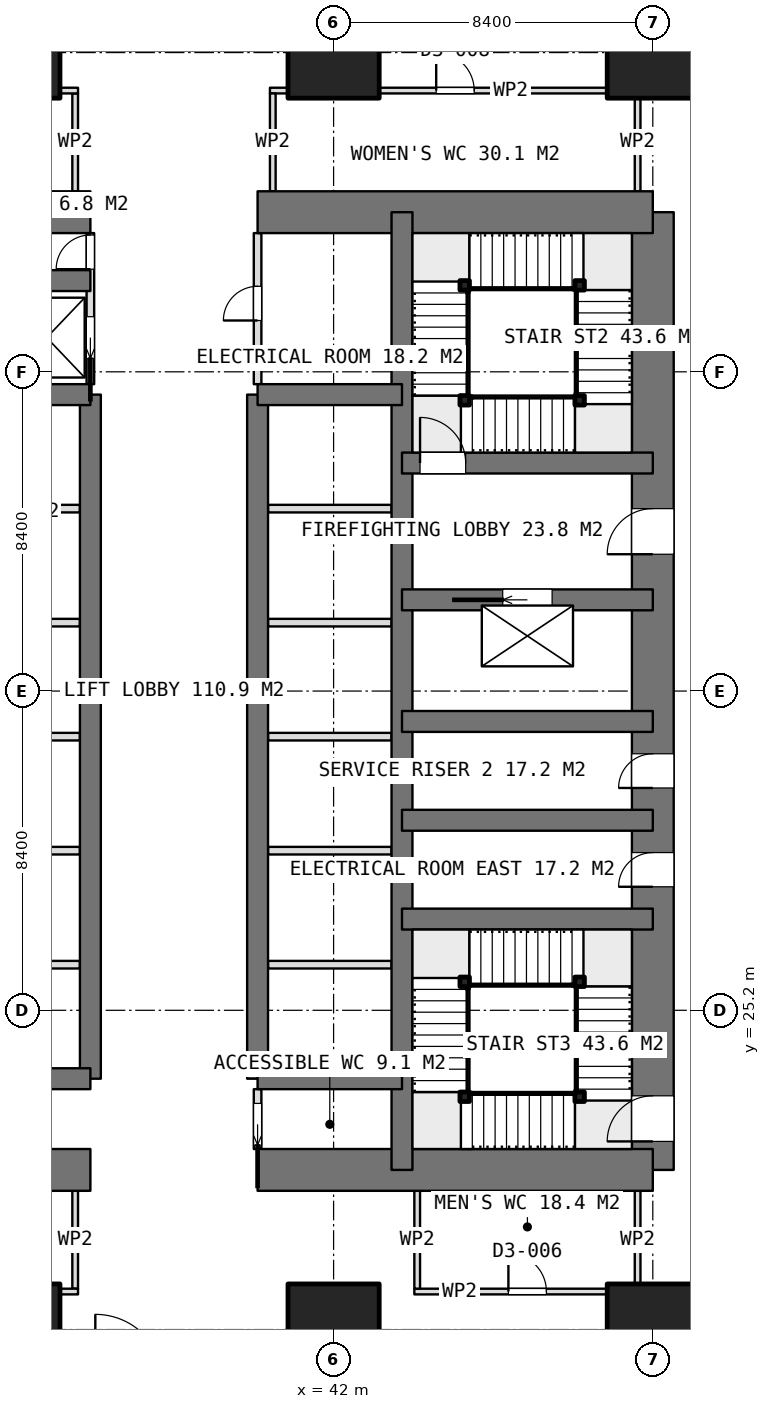
"""IFC4 building model, lengths in metres.
Left out: names, types, materials, properties, quantities, classifications, styles, units other than length and angle.
Written with IfcOpenShell. Run it as: python <this file> out.ifc"""

import sys

from ifc_helpers import new_model, si_unit, direction, frame, frame_2d, origin, origin_2d, place, context, subcontext, project, spatial, rectangle, extrude, element, fill, save


model = new_model("IFC4")
c1 = context("Model", 3, precision=1e-05, world=origin(), true_north=direction((0.0, 1.0)))
c2 = subcontext(c1, "Body", "Model", "MODEL_VIEW")
j1 = project(units=[si_unit("LENGTHUNIT", "METRE"), si_unit("PLANEANGLEUNIT", "RADIAN")], contexts=[c1])
p1 = place(None, origin())
s1 = spatial("IfcSite", under=j1, at=p1, CompositionType="ELEMENT")
p2 = place(p1, origin())
s2 = spatial("IfcBuilding", under=s1, at=p2, CompositionType="ELEMENT")
p3 = place(p2, frame((0.0, 0.0, -5.4)))
s3 = spatial("IfcBuildingStorey", under=s2, at=p3, CompositionType="ELEMENT", Elevation=-5.4)
p4 = place(p3, frame((25.2, 21.0, 0.0), z_axis=(0.0, 0.0, 1.0), x_axis=(1.0, 0.0, 0.0)))
e1 = element("IfcWall", 1, at=p4, inside=s3, PredefinedType="SHEAR", context=c2, shape_type="SweptSolid", body=[
    extrude(rectangle(XDim=10.4, YDim=1.1, at=frame_2d((5.2, 0.0))), origin(), (0.0, 0.0, 1.0), 5.4),
])
p5 = place(p3, frame((40.0, 21.0, 0.0), z_axis=(0.0, 0.0, 1.0), x_axis=(1.0, 0.0, 0.0)))
e2 = element("IfcWall", 2, at=p5, inside=s3, PredefinedType="SHEAR", context=c2, shape_type="SweptSolid", body=[
    extrude(rectangle(XDim=10.4, YDim=1.1, at=frame_2d((5.2, 0.0))), origin(), (0.0, 0.0, 1.0), 5.4),
])
p6 = place(p3, frame((25.2, 46.2, 0.0), z_axis=(0.0, 0.0, 1.0), x_axis=(1.0, 0.0, 0.0)))
e3 = element("IfcWall", 3, at=p6, inside=s3, PredefinedType="SHEAR", context=c2, shape_type="SweptSolid", body=[
    extrude(rectangle(XDim=10.4, YDim=1.1, at=frame_2d((5.2, 0.0))), origin(), (0.0, 0.0, 1.0), 5.4),
])
p7 = place(p3, frame((40.0, 46.2, 0.0), z_axis=(0.0, 0.0, 1.0), x_axis=(1.0, 0.0, 0.0)))
e4 = element("IfcWall", 4, at=p7, inside=s3, PredefinedType="SHEAR", context=c2, shape_type="SweptSolid", body=[
    extrude(rectangle(XDim=10.4, YDim=1.1, at=frame_2d((5.2, 0.0))), origin(), (0.0, 0.0, 1.0), 5.4),
])
p8 = place(p3, frame((50.4, 21.0, 0.0), z_axis=(0.0, 0.0, 1.0), x_axis=(0.0, 1.0, 0.0)))
e5 = element("IfcWall", 5, at=p8, inside=s3, PredefinedType="SHEAR", context=c2, shape_type="SweptSolid", body=[
    extrude(rectangle(XDim=25.2, YDim=1.1, at=frame_2d((12.6, 0.0))), origin(), (0.0, 0.0, 1.0), 5.4),
])
p9 = place(p8, frame((16.2, 0.0, 0.0)))
e6 = element("IfcOpeningElement", 6, at=p9, cuts=e5, PredefinedType="OPENING", context=c2, shape_type="SweptSolid", body=[
    extrude(rectangle(XDim=1.2, YDim=2.1, at=frame_2d((0.6, 1.05))), frame((0.0, 0.56, 0.0), z_axis=(0.0, -1.0, 0.0), x_axis=(1.0, 0.0, 0.0)), (0.0, 0.0, 1.0), 1.12),
])
p10 = place(p8, frame((10.05, 0.0, 0.0)))
e7 = element("IfcOpeningElement", 7, at=p10, cuts=e5, PredefinedType="OPENING", context=c2, shape_type="SweptSolid", body=[
    extrude(rectangle(XDim=0.9, YDim=2.1, at=frame_2d((0.45, 1.05))), frame((0.0, 0.56, 0.0), z_axis=(0.0, -1.0, 0.0), x_axis=(1.0, 0.0, 0.0)), (0.0, 0.0, 1.0), 1.12),
])
p11 = place(p8, frame((7.45, 0.0, 0.0)))
e8 = element("IfcOpeningElement", 8, at=p11, cuts=e5, PredefinedType="OPENING", context=c2, shape_type="SweptSolid", body=[
    extrude(rectangle(XDim=0.9, YDim=2.1, at=frame_2d((0.45, 1.05))), frame((0.0, 0.56, 0.0), z_axis=(0.0, -1.0, 0.0), x_axis=(1.0, 0.0, 0.0)), (0.0, 0.0, 1.0), 1.12),
])
p12 = place(p8, frame((0.75, 0.0, 0.0)))
e9 = element("IfcOpeningElement", 9, at=p12, cuts=e5, PredefinedType="OPENING", context=c2, shape_type="SweptSolid", body=[
    extrude(rectangle(XDim=1.2, YDim=2.1, at=frame_2d((0.6, 1.05))), frame((0.0, 0.56, 0.0), z_axis=(0.0, -1.0, 0.0), x_axis=(1.0, 0.0, 0.0)), (0.0, 0.0, 1.0), 1.12),
])
p13 = place(p3, frame((43.8, 21.0, 0.0), z_axis=(0.0, 0.0, 1.0), x_axis=(0.0, 1.0, 0.0)))
e10 = element("IfcWall", 10, at=p13, inside=s3, PredefinedType="SHEAR", context=c2, shape_type="SweptSolid", body=[
    extrude(rectangle(XDim=25.2, YDim=0.55, at=frame_2d((12.6, 0.0))), origin(), (0.0, 0.0, 1.0), 5.4),
])
for number, where, z_axis, x_axis in (
    (11, (35.6, 23.4, 0.0), (0.0, 0.0, 1.0), (0.0, 1.0, 0.0)),
    (12, (40.0, 23.4, 0.0), (0.0, 0.0, 1.0), (0.0, 1.0, 0.0)),
):
    element("IfcWall", number, at=place(p3, frame(where, z_axis=z_axis, x_axis=x_axis)), inside=s3, PredefinedType="SHEAR", context=c2, shape_type="SweptSolid", body=[
        extrude(rectangle(XDim=18.0, YDim=0.55, at=frame_2d((9.0, 0.0))), origin(), (0.0, 0.0, 1.0), 5.4),
    ])
for number, where, z_axis, x_axis in (
    (13, (31.8, 23.4, 0.0), (0.0, 0.0, 1.0), (1.0, 0.0, 0.0)),
    (14, (31.8, 41.4, 0.0), (0.0, 0.0, 1.0), (1.0, 0.0, 0.0)),
    (15, (31.8, 44.4, 0.0), (0.0, 0.0, 1.0), (1.0, 0.0, 0.0)),
    (16, (40.0, 23.4, 0.0), (0.0, 0.0, 1.0), (1.0, 0.0, 0.0)),
    (17, (40.0, 41.4, 0.0), (0.0, 0.0, 1.0), (1.0, 0.0, 0.0)),
):
    element("IfcWall", number, at=place(p3, frame(where, z_axis=z_axis, x_axis=x_axis)), inside=s3, PredefinedType="SHEAR", context=c2, shape_type="SweptSolid", body=[
        extrude(rectangle(XDim=3.8, YDim=0.55, at=frame_2d((1.9, 0.0))), origin(), (0.0, 0.0, 1.0), 5.4),
    ])
for number, where, z_axis, x_axis in (
    (18, (43.8, 27.6, 0.0), (0.0, 0.0, 1.0), (1.0, 0.0, 0.0)),
    (19, (43.8, 30.2, 0.0), (0.0, 0.0, 1.0), (1.0, 0.0, 0.0)),
    (20, (43.8, 32.8, 0.0), (0.0, 0.0, 1.0), (1.0, 0.0, 0.0)),
):
    element("IfcWall", number, at=place(p3, frame(where, z_axis=z_axis, x_axis=x_axis)), inside=s3, PredefinedType="SHEAR", context=c2, shape_type="SweptSolid", body=[
        extrude(rectangle(XDim=6.6, YDim=0.55, at=frame_2d((3.3, 0.0))), origin(), (0.0, 0.0, 1.0), 5.4),
    ])
p14 = place(p3, frame((43.8, 36.0, 0.0), z_axis=(0.0, 0.0, 1.0), x_axis=(1.0, 0.0, 0.0)))
e21 = element("IfcWall", 21, at=p14, inside=s3, PredefinedType="SHEAR", context=c2, shape_type="SweptSolid", body=[
    extrude(rectangle(XDim=6.6, YDim=0.55, at=frame_2d((3.3, 0.0))), origin(), (0.0, 0.0, 1.0), 5.4),
])
p15 = place(p14, frame((2.65, 0.0, 0.0)))
e22 = element("IfcOpeningElement", 22, at=p15, cuts=e21, PredefinedType="OPENING", context=c2, shape_type="SweptSolid", body=[
    extrude(rectangle(XDim=1.3, YDim=2.1, at=frame_2d((0.65, 1.05))), frame((0.0, 0.285, 0.0), z_axis=(0.0, -1.0, 0.0), x_axis=(1.0, 0.0, 0.0)), (0.0, 0.0, 1.0), 0.57),
])
p16 = place(p3, frame((43.8, 39.6, 0.0), z_axis=(0.0, 0.0, 1.0), x_axis=(1.0, 0.0, 0.0)))
e23 = element("IfcWall", 23, at=p16, inside=s3, PredefinedType="SHEAR", context=c2, shape_type="SweptSolid", body=[
    extrude(rectangle(XDim=6.6, YDim=0.55, at=frame_2d((3.3, 0.0))), origin(), (0.0, 0.0, 1.0), 5.4),
])
p17 = place(p16, frame((0.475, 0.0, 0.0)))
e24 = element("IfcOpeningElement", 24, at=p17, cuts=e23, PredefinedType="OPENING", context=c2, shape_type="SweptSolid", body=[
    extrude(rectangle(XDim=1.2, YDim=2.1, at=frame_2d((0.6, 1.05))), frame((0.0, 0.285, 0.0), z_axis=(0.0, -1.0, 0.0), x_axis=(1.0, 0.0, 0.0)), (0.0, 0.0, 1.0), 0.57),
])
for number, where, z_axis, x_axis in (
    (25, (33.6, 16.8, 0.0), (0.0, 0.0, 1.0), (1.0, 0.0, 0.0)),
    (26, (33.6, 50.4, 0.0), (0.0, 0.0, 1.0), (1.0, 0.0, 0.0)),
    (27, (42.0, 16.8, 0.0), (0.0, 0.0, 1.0), (1.0, 0.0, 0.0)),
    (28, (42.0, 50.4, 0.0), (0.0, 0.0, 1.0), (1.0, 0.0, 0.0)),
    (29, (50.4, 16.8, 0.0), (0.0, 0.0, 1.0), (1.0, 0.0, 0.0)),
    (30, (50.4, 50.4, 0.0), (0.0, 0.0, 1.0), (1.0, 0.0, 0.0)),
):
    element("IfcColumn", number, at=place(p3, frame(where, z_axis=z_axis, x_axis=x_axis)), inside=s3, PredefinedType="COLUMN", context=c2, shape_type="SweptSolid", body=[
        extrude(rectangle(XDim=2.4, YDim=2.4, at=origin_2d()), origin(), (0.0, 0.0, 1.0), 5.4),
    ])
for number, where, z_axis, x_axis in (
    (31, (32.075, 26.4, 0.0), (0.0, 0.0, 1.0), (1.0, 0.0, 0.0)),
    (32, (32.075, 29.4, 0.0), (0.0, 0.0, 1.0), (1.0, 0.0, 0.0)),
    (33, (32.075, 32.4, 0.0), (0.0, 0.0, 1.0), (1.0, 0.0, 0.0)),
    (34, (32.075, 35.4, 0.0), (0.0, 0.0, 1.0), (1.0, 0.0, 0.0)),
    (35, (32.075, 38.4, 0.0), (0.0, 0.0, 1.0), (1.0, 0.0, 0.0)),
    (36, (40.275, 26.4, 0.0), (0.0, 0.0, 1.0), (1.0, 0.0, 0.0)),
    (37, (40.275, 29.4, 0.0), (0.0, 0.0, 1.0), (1.0, 0.0, 0.0)),
    (38, (40.275, 32.4, 0.0), (0.0, 0.0, 1.0), (1.0, 0.0, 0.0)),
    (39, (40.275, 35.4, 0.0), (0.0, 0.0, 1.0), (1.0, 0.0, 0.0)),
    (40, (40.275, 38.4, 0.0), (0.0, 0.0, 1.0), (1.0, 0.0, 0.0)),
):
    element("IfcWall", number, at=place(p3, frame(where, z_axis=z_axis, x_axis=x_axis)), inside=s3, PredefinedType="PARTITIONING", context=c2, shape_type="SweptSolid", body=[
        extrude(rectangle(XDim=3.25, YDim=0.2, at=frame_2d((1.625, 0.0))), origin(), (0.0, 0.0, 1.0), 5.1),
    ])
p18 = place(p3, frame((40.0, 21.55, 0.0), z_axis=(0.0, 0.0, 1.0), x_axis=(0.0, 1.0, 0.0)))
e41 = element("IfcWall", 41, at=p18, inside=s3, PredefinedType="PARTITIONING", context=c2, shape_type="SweptSolid", body=[
    extrude(rectangle(XDim=1.575, YDim=0.2, at=frame_2d((0.788, 0.0))), origin(), (0.0, 0.0, 1.0), 5.1),
])
p19 = place(p18, frame((0.1, 0.0, 0.0)))
e42 = element("IfcOpeningElement", 42, at=p19, cuts=e41, PredefinedType="OPENING", context=c2, shape_type="SweptSolid", body=[
    extrude(rectangle(XDim=1.1, YDim=2.1, at=frame_2d((0.55, 1.05))), frame((0.0, 0.11, 0.0), z_axis=(0.0, -1.0, 0.0), x_axis=(1.0, 0.0, 0.0)), (0.0, 0.0, 1.0), 0.22),
])
p20 = place(p3, frame((40.0, 41.675, 0.0), z_axis=(0.0, 0.0, 1.0), x_axis=(0.0, 1.0, 0.0)))
e43 = element("IfcWall", 43, at=p20, inside=s3, PredefinedType="PARTITIONING", context=c2, shape_type="SweptSolid", body=[
    extrude(rectangle(XDim=3.975, YDim=0.2, at=frame_2d((1.987, 0.0))), origin(), (0.0, 0.0, 1.0), 5.1),
])
p21 = place(p20, frame((1.675, 0.0, 0.0)))
e44 = element("IfcOpeningElement", 44, at=p21, cuts=e43, PredefinedType="OPENING", context=c2, shape_type="SweptSolid", body=[
    extrude(rectangle(XDim=0.9, YDim=2.1, at=frame_2d((0.45, 1.05))), frame((0.0, 0.11, 0.0), z_axis=(0.0, -1.0, 0.0), x_axis=(1.0, 0.0, 0.0)), (0.0, 0.0, 1.0), 0.22),
])
p22 = place(p3, frame((35.6, 41.675, 0.0), z_axis=(0.0, 0.0, 1.0), x_axis=(0.0, 1.0, 0.0)))
e45 = element("IfcWall", 45, at=p22, inside=s3, PredefinedType="PARTITIONING", context=c2, shape_type="SweptSolid", body=[
    extrude(rectangle(XDim=3.975, YDim=0.2, at=frame_2d((1.987, 0.0))), origin(), (0.0, 0.0, 1.0), 5.1),
])
p23 = place(p22, frame((3.025, 0.0, 0.0)))
e46 = element("IfcOpeningElement", 46, at=p23, cuts=e45, PredefinedType="OPENING", context=c2, shape_type="SweptSolid", body=[
    extrude(rectangle(XDim=0.9, YDim=2.1, at=frame_2d((0.45, 1.05))), frame((0.0, 0.11, 0.0), z_axis=(0.0, -1.0, 0.0), x_axis=(1.0, 0.0, 0.0)), (0.0, 0.0, 1.0), 0.22),
])
p24 = place(p22, frame((0.675, 0.0, 0.0)))
e47 = element("IfcOpeningElement", 47, at=p24, cuts=e45, PredefinedType="OPENING", context=c2, shape_type="SweptSolid", body=[
    extrude(rectangle(XDim=1.1, YDim=2.1, at=frame_2d((0.55, 1.05))), frame((0.0, 0.11, 0.0), z_axis=(0.0, -1.0, 0.0), x_axis=(1.0, 0.0, 0.0)), (0.0, 0.0, 1.0), 0.22),
])
p25 = place(p3, frame((40.325, 49.4, 0.0), z_axis=(0.0, 0.0, 1.0), x_axis=(1.0, 0.0, 0.0)))
e48 = element("IfcWall", 48, at=p25, inside=s3, PredefinedType="PARTITIONING", context=c2, shape_type="SweptSolid", body=[
    extrude(rectangle(XDim=9.75, YDim=0.15, at=frame_2d((4.875, 0.0))), origin(), (0.0, 0.0, 1.0), 5.1),
])
p26 = place(p25, frame((4.375, 0.0, 0.0)))
e49 = element("IfcOpeningElement", 49, at=p26, cuts=e48, PredefinedType="OPENING", context=c2, shape_type="SweptSolid", body=[
    extrude(rectangle(XDim=1.0, YDim=2.1, at=frame_2d((0.5, 1.05))), frame((0.0, 0.085, 0.0), z_axis=(0.0, -1.0, 0.0), x_axis=(1.0, 0.0, 0.0)), (0.0, 0.0, 1.0), 0.17),
])
for number, where, z_axis, x_axis in (
    (50, (40.4, 46.75, 0.0), (0.0, 0.0, 1.0), (0.0, 1.0, 0.0)),
    (51, (50.0, 46.75, 0.0), (0.0, 0.0, 1.0), (0.0, 1.0, 0.0)),
):
    element("IfcWall", number, at=place(p3, frame(where, z_axis=z_axis, x_axis=x_axis)), inside=s3, PredefinedType="PARTITIONING", context=c2, shape_type="SweptSolid", body=[
        extrude(rectangle(XDim=2.575, YDim=0.15, at=frame_2d((1.288, 0.0))), origin(), (0.0, 0.0, 1.0), 5.1),
    ])
p27 = place(p3, frame((25.525, 49.4, 0.0), z_axis=(0.0, 0.0, 1.0), x_axis=(1.0, 0.0, 0.0)))
e52 = element("IfcWall", 52, at=p27, inside=s3, PredefinedType="PARTITIONING", context=c2, shape_type="SweptSolid", body=[
    extrude(rectangle(XDim=9.75, YDim=0.15, at=frame_2d((4.875, 0.0))), origin(), (0.0, 0.0, 1.0), 5.1),
])
p28 = place(p27, frame((4.375, 0.0, 0.0)))
e53 = element("IfcOpeningElement", 53, at=p28, cuts=e52, PredefinedType="OPENING", context=c2, shape_type="SweptSolid", body=[
    extrude(rectangle(XDim=1.0, YDim=2.1, at=frame_2d((0.5, 1.05))), frame((0.0, 0.085, 0.0), z_axis=(0.0, -1.0, 0.0), x_axis=(1.0, 0.0, 0.0)), (0.0, 0.0, 1.0), 0.17),
])
p29 = place(p3, frame((35.2, 46.75, 0.0), z_axis=(0.0, 0.0, 1.0), x_axis=(0.0, 1.0, 0.0)))
e54 = element("IfcWall", 54, at=p29, inside=s3, PredefinedType="PARTITIONING", context=c2, shape_type="SweptSolid", body=[
    extrude(rectangle(XDim=2.575, YDim=0.15, at=frame_2d((1.288, 0.0))), origin(), (0.0, 0.0, 1.0), 5.1),
])
p30 = place(p3, frame((25.525, 17.8, 0.0), z_axis=(0.0, 0.0, 1.0), x_axis=(1.0, 0.0, 0.0)))
e55 = element("IfcWall", 55, at=p30, inside=s3, PredefinedType="PARTITIONING", context=c2, shape_type="SweptSolid", body=[
    extrude(rectangle(XDim=9.75, YDim=0.15, at=frame_2d((4.875, 0.0))), origin(), (0.0, 0.0, 1.0), 5.1),
])
p31 = place(p30, frame((4.375, 0.0, 0.0)))
e56 = element("IfcOpeningElement", 56, at=p31, cuts=e55, PredefinedType="OPENING", context=c2, shape_type="SweptSolid", body=[
    extrude(rectangle(XDim=1.0, YDim=2.1, at=frame_2d((0.5, 1.05))), frame((0.0, 0.085, 0.0), z_axis=(0.0, -1.0, 0.0), x_axis=(1.0, 0.0, 0.0)), (0.0, 0.0, 1.0), 0.17),
])
p32 = place(p3, frame((35.2, 17.875, 0.0), z_axis=(0.0, 0.0, 1.0), x_axis=(0.0, 1.0, 0.0)))
e57 = element("IfcWall", 57, at=p32, inside=s3, PredefinedType="PARTITIONING", context=c2, shape_type="SweptSolid", body=[
    extrude(rectangle(XDim=2.575, YDim=0.15, at=frame_2d((1.288, 0.0))), origin(), (0.0, 0.0, 1.0), 5.1),
])
p33 = place(p3, frame((44.125, 17.8, 0.0), z_axis=(0.0, 0.0, 1.0), x_axis=(1.0, 0.0, 0.0)))
e58 = element("IfcWall", 58, at=p33, inside=s3, PredefinedType="PARTITIONING", context=c2, shape_type="SweptSolid", body=[
    extrude(rectangle(XDim=5.95, YDim=0.15, at=frame_2d((2.975, 0.0))), origin(), (0.0, 0.0, 1.0), 5.1),
])
p34 = place(p33, frame((2.475, 0.0, 0.0)))
e59 = element("IfcOpeningElement", 59, at=p34, cuts=e58, PredefinedType="OPENING", context=c2, shape_type="SweptSolid", body=[
    extrude(rectangle(XDim=1.0, YDim=2.1, at=frame_2d((0.5, 1.05))), frame((0.0, 0.085, 0.0), z_axis=(0.0, -1.0, 0.0), x_axis=(1.0, 0.0, 0.0)), (0.0, 0.0, 1.0), 0.17),
])
for number, where, z_axis, x_axis in (
    (60, (44.2, 17.875, 0.0), (0.0, 0.0, 1.0), (0.0, 1.0, 0.0)),
    (61, (50.0, 17.875, 0.0), (0.0, 0.0, 1.0), (0.0, 1.0, 0.0)),
):
    element("IfcWall", number, at=place(p3, frame(where, z_axis=z_axis, x_axis=x_axis)), inside=s3, PredefinedType="PARTITIONING", context=c2, shape_type="SweptSolid", body=[
        extrude(rectangle(XDim=2.575, YDim=0.15, at=frame_2d((1.288, 0.0))), origin(), (0.0, 0.0, 1.0), 5.1),
    ])
for number, where, z_axis, x_axis in (
    (62, (45.45, 41.25, 0.0), (0.0, 0.0, 1.0), (1.0, 0.0, 0.0)),
    (63, (45.45, 44.275, 0.0), (0.0, 0.0, 1.0), (1.0, 0.0, 0.0)),
    (64, (48.475, 44.275, 0.0), (0.0, 0.0, 1.0), (1.0, 0.0, 0.0)),
    (65, (48.475, 41.25, 0.0), (0.0, 0.0, 1.0), (1.0, 0.0, 0.0)),
    (66, (48.475, 22.925, 0.0), (0.0, 0.0, 1.0), (1.0, 0.0, 0.0)),
    (67, (45.45, 22.925, 0.0), (0.0, 0.0, 1.0), (1.0, 0.0, 0.0)),
    (68, (45.45, 25.95, 0.0), (0.0, 0.0, 1.0), (1.0, 0.0, 0.0)),
    (69, (48.475, 25.95, 0.0), (0.0, 0.0, 1.0), (1.0, 0.0, 0.0)),
):
    element("IfcColumn", number, at=place(p3, frame(where, z_axis=z_axis, x_axis=x_axis)), inside=s3, PredefinedType="COLUMN", context=c2, shape_type="SweptSolid", body=[
        extrude(rectangle(XDim=0.25, YDim=0.25, at=origin_2d()), origin(), (0.0, 0.0, 1.0), 5.4),
    ])
p35 = place(p9, origin())
e70 = element("IfcDoor", 70, at=p35, inside=s3, OperationType="SINGLE_SWING_LEFT", PredefinedType="DOOR", context=c2, shape_type="SweptSolid", body=[
    extrude(rectangle(XDim=1.2, YDim=2.1, at=frame_2d((0.6, 1.05))), frame((0.0, 0.025, 0.0), z_axis=(0.0, -1.0, 0.0), x_axis=(1.0, 0.0, 0.0)), (0.0, 0.0, 1.0), 0.05),
])
fill(e6, e70)
p36 = place(p10, origin())
e71 = element("IfcDoor", 71, at=p36, inside=s3, OperationType="SINGLE_SWING_LEFT", PredefinedType="DOOR", context=c2, shape_type="SweptSolid", body=[
    extrude(rectangle(XDim=0.9, YDim=2.1, at=frame_2d((0.45, 1.05))), frame((0.0, 0.025, 0.0), z_axis=(0.0, -1.0, 0.0), x_axis=(1.0, 0.0, 0.0)), (0.0, 0.0, 1.0), 0.05),
])
fill(e7, e71)
p37 = place(p11, origin())
e72 = element("IfcDoor", 72, at=p37, inside=s3, OperationType="SINGLE_SWING_LEFT", PredefinedType="DOOR", context=c2, shape_type="SweptSolid", body=[
    extrude(rectangle(XDim=0.9, YDim=2.1, at=frame_2d((0.45, 1.05))), frame((0.0, 0.025, 0.0), z_axis=(0.0, -1.0, 0.0), x_axis=(1.0, 0.0, 0.0)), (0.0, 0.0, 1.0), 0.05),
])
fill(e8, e72)
p38 = place(p19, origin())
e73 = element("IfcDoor", 73, at=p38, inside=s3, OperationType="SLIDING_TO_LEFT", PredefinedType="DOOR", context=c2, shape_type="SweptSolid", body=[
    extrude(rectangle(XDim=1.1, YDim=2.1, at=frame_2d((0.55, 1.05))), frame((0.0, 0.025, 0.0), z_axis=(0.0, -1.0, 0.0), x_axis=(1.0, 0.0, 0.0)), (0.0, 0.0, 1.0), 0.05),
])
fill(e42, e73)
p39 = place(p21, origin())
e74 = element("IfcDoor", 74, at=p39, inside=s3, OperationType="SINGLE_SWING_LEFT", PredefinedType="DOOR", context=c2, shape_type="SweptSolid", body=[
    extrude(rectangle(XDim=0.9, YDim=2.1, at=frame_2d((0.45, 1.05))), frame((0.0, 0.025, 0.0), z_axis=(0.0, -1.0, 0.0), x_axis=(1.0, 0.0, 0.0)), (0.0, 0.0, 1.0), 0.05),
])
fill(e44, e74)
p40 = place(p23, origin())
e75 = element("IfcDoor", 75, at=p40, inside=s3, OperationType="SINGLE_SWING_LEFT", PredefinedType="DOOR", context=c2, shape_type="SweptSolid", body=[
    extrude(rectangle(XDim=0.9, YDim=2.1, at=frame_2d((0.45, 1.05))), frame((0.0, 0.025, 0.0), z_axis=(0.0, -1.0, 0.0), x_axis=(1.0, 0.0, 0.0)), (0.0, 0.0, 1.0), 0.05),
])
fill(e46, e75)
p41 = place(p15, origin())
e76 = element("IfcDoor", 76, at=p41, inside=s3, OperationType="SLIDING_TO_LEFT", PredefinedType="USERDEFINED", context=c2, shape_type="SweptSolid", body=[
    extrude(rectangle(XDim=1.3, YDim=2.1, at=frame_2d((0.65, 1.05))), frame((0.0, 0.025, 0.0), z_axis=(0.0, -1.0, 0.0), x_axis=(1.0, 0.0, 0.0)), (0.0, 0.0, 1.0), 0.05),
])
fill(e22, e76)
p42 = place(p24, origin())
e77 = element("IfcDoor", 77, at=p42, inside=s3, OperationType="SLIDING_TO_LEFT", PredefinedType="USERDEFINED", context=c2, shape_type="SweptSolid", body=[
    extrude(rectangle(XDim=1.1, YDim=2.1, at=frame_2d((0.55, 1.05))), frame((0.0, 0.025, 0.0), z_axis=(0.0, -1.0, 0.0), x_axis=(1.0, 0.0, 0.0)), (0.0, 0.0, 1.0), 0.05),
])
fill(e47, e77)
p43 = place(p26, origin())
e78 = element("IfcDoor", 78, at=p43, inside=s3, OperationType="SINGLE_SWING_LEFT", PredefinedType="DOOR", context=c2, shape_type="SweptSolid", body=[
    extrude(rectangle(XDim=1.0, YDim=2.1, at=frame_2d((0.5, 1.05))), frame((0.0, 0.025, 0.0), z_axis=(0.0, -1.0, 0.0), x_axis=(1.0, 0.0, 0.0)), (0.0, 0.0, 1.0), 0.05),
])
fill(e49, e78)
p44 = place(p34, origin())
e79 = element("IfcDoor", 79, at=p44, inside=s3, OperationType="SINGLE_SWING_LEFT", PredefinedType="DOOR", context=c2, shape_type="SweptSolid", body=[
    extrude(rectangle(XDim=1.0, YDim=2.1, at=frame_2d((0.5, 1.05))), frame((0.0, 0.025, 0.0), z_axis=(0.0, -1.0, 0.0), x_axis=(1.0, 0.0, 0.0)), (0.0, 0.0, 1.0), 0.05),
])
fill(e59, e79)
p45 = place(p17, origin())
e80 = element("IfcDoor", 80, at=p45, inside=s3, OperationType="SINGLE_SWING_RIGHT", PredefinedType="DOOR", context=c2, shape_type="SweptSolid", body=[
    extrude(rectangle(XDim=1.2, YDim=2.1, at=frame_2d((0.6, 1.05))), frame((0.0, 0.025, 0.0), z_axis=(0.0, -1.0, 0.0), x_axis=(1.0, 0.0, 0.0)), (0.0, 0.0, 1.0), 0.05),
])
fill(e24, e80)
p46 = place(p12, origin())
e81 = element("IfcDoor", 81, at=p46, inside=s3, OperationType="SINGLE_SWING_RIGHT", PredefinedType="DOOR", context=c2, shape_type="SweptSolid", body=[
    extrude(rectangle(XDim=1.2, YDim=2.1, at=frame_2d((0.6, 1.05))), frame((0.0, 0.025, 0.0), z_axis=(0.0, -1.0, 0.0), x_axis=(1.0, 0.0, 0.0)), (0.0, 0.0, 1.0), 0.05),
])
fill(e9, e81)
save(model, sys.argv[1])
